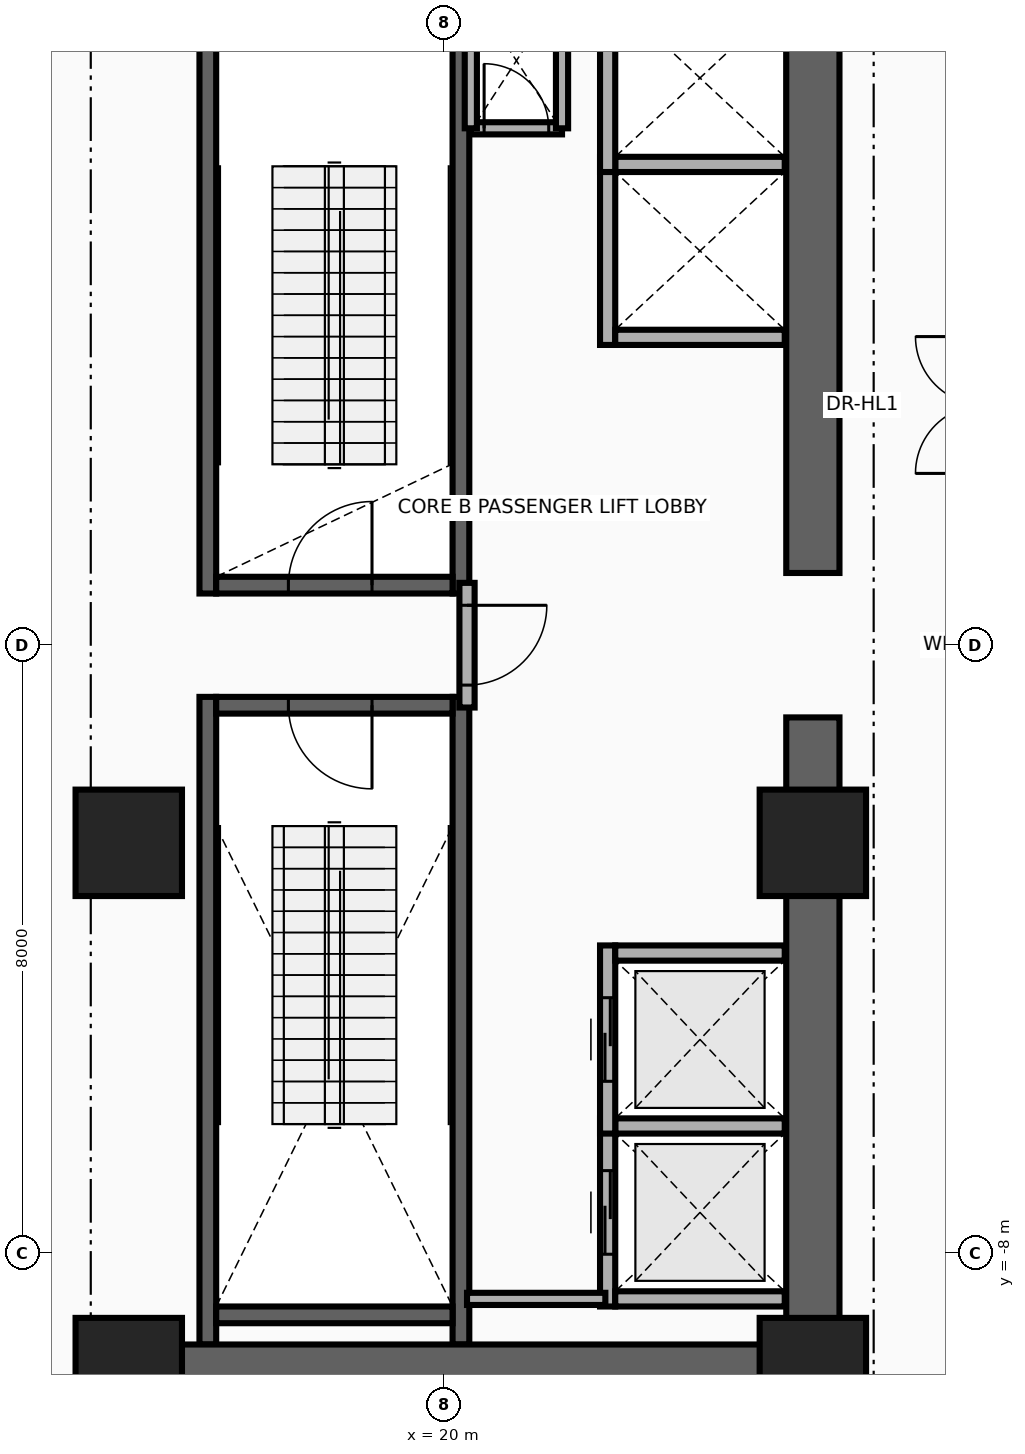
"""IFC4 building model, lengths in metres.
Left out: names, types, materials, properties, quantities, classifications, styles, units other than length and angle.
Written with IfcOpenShell. Run it as: python <this file> out.ifc"""

import sys

from ifc_helpers import new_model, si_unit, direction, frame, frame_2d, origin, origin_2d, place, context, subcontext, project, spatial, rectangle, extrude, source, transform, mapped, element, fill, save


model = new_model("IFC4")
c1 = context("Model", 3, precision=1e-05, world=origin(), true_north=direction((0.0, 1.0)))
c2 = subcontext(c1, "Body", "Model", "MODEL_VIEW")
j1 = project(units=[si_unit("LENGTHUNIT", "METRE"), si_unit("PLANEANGLEUNIT", "RADIAN")], contexts=[c1])
p1 = place(None, origin())
s1 = spatial("IfcSite", under=j1, at=p1, CompositionType="ELEMENT")
p2 = place(p1, origin())
s2 = spatial("IfcBuilding", under=s1, at=p2, CompositionType="ELEMENT")
p3 = place(p2, frame((0.0, 0.0, 15.6)))
s3 = spatial("IfcBuildingStorey", under=s2, at=p3, CompositionType="ELEMENT", Elevation=15.6)
for number, where, z_axis, x_axis in (
    (1, (16.89, 0.68, 0.0), (0.0, 0.0, 1.0), (0.0, 1.0, 0.0)),
    (2, (20.22, 0.68, 0.0), (0.0, 0.0, 1.0), (0.0, 1.0, 0.0)),
):
    element("IfcWall", number, at=place(p3, frame(where, z_axis=z_axis, x_axis=x_axis)), inside=s3, PredefinedType="SHEAR", context=c2, shape_type="SweptSolid", body=[
        extrude(rectangle(XDim=8.52, YDim=0.22, at=frame_2d((4.26, 0.0))), origin(), (0.0, 0.0, 1.0), 4.8),
    ])
p4 = place(p3, frame((17.0, 0.79, 0.0), z_axis=(0.0, 0.0, 1.0), x_axis=(1.0, 0.0, 0.0)))
e3 = element("IfcWall", 3, at=p4, inside=s3, PredefinedType="SHEAR", context=c2, shape_type="SweptSolid", body=[
    extrude(rectangle(XDim=3.11, YDim=0.22, at=frame_2d((1.555, 0.0))), origin(), (0.0, 0.0, 1.0), 4.8),
])
p5 = place(p4, frame((0.95, 0.0, 0.0)))
e4 = element("IfcOpeningElement", 4, at=p5, cuts=e3, PredefinedType="OPENING", context=c2, shape_type="SweptSolid", body=[
    extrude(rectangle(XDim=1.1, YDim=2.15, at=frame_2d((0.55, 1.075))), frame((0.0, 0.125, 0.0), z_axis=(0.0, -1.0, 0.0), x_axis=(1.0, 0.0, 0.0)), (0.0, 0.0, 1.0), 0.25),
])
for number, where, z_axis, x_axis in (
    (5, (16.89, -9.2, 0.0), (0.0, 0.0, 1.0), (0.0, 1.0, 0.0)),
    (6, (20.22, -9.2, 0.0), (0.0, 0.0, 1.0), (0.0, 1.0, 0.0)),
):
    element("IfcWall", number, at=place(p3, frame(where, z_axis=z_axis, x_axis=x_axis)), inside=s3, PredefinedType="SHEAR", context=c2, shape_type="SweptSolid", body=[
        extrude(rectangle(XDim=8.52, YDim=0.22, at=frame_2d((4.26, 0.0))), origin(), (0.0, 0.0, 1.0), 4.8),
    ])
p6 = place(p3, frame((17.0, -8.81, 0.0), z_axis=(0.0, 0.0, 1.0), x_axis=(1.0, 0.0, 0.0)))
e7 = element("IfcWall", 7, at=p6, inside=s3, PredefinedType="SHEAR", context=c2, shape_type="SweptSolid", body=[
    extrude(rectangle(XDim=3.11, YDim=0.22, at=frame_2d((1.555, 0.0))), origin(), (0.0, 0.0, 1.0), 4.8),
])
p7 = place(p3, frame((17.0, -0.79, 0.0), z_axis=(0.0, 0.0, 1.0), x_axis=(1.0, 0.0, 0.0)))
e8 = element("IfcWall", 8, at=p7, inside=s3, PredefinedType="SHEAR", context=c2, shape_type="SweptSolid", body=[
    extrude(rectangle(XDim=3.11, YDim=0.22, at=frame_2d((1.555, 0.0))), origin(), (0.0, 0.0, 1.0), 4.8),
])
p8 = place(p7, frame((0.95, 0.0, 0.0)))
e9 = element("IfcOpeningElement", 9, at=p8, cuts=e8, PredefinedType="OPENING", context=c2, shape_type="SweptSolid", body=[
    extrude(rectangle(XDim=1.1, YDim=2.15, at=frame_2d((0.55, 1.075))), frame((0.0, 0.125, 0.0), z_axis=(0.0, -1.0, 0.0), x_axis=(1.0, 0.0, 0.0)), (0.0, 0.0, 1.0), 0.25),
])
for number, where, z_axis, x_axis in (
    (10, (24.85, -9.9, 0.0), (0.0, 0.0, 1.0), (0.0, 1.0, 0.0)),
    (11, (24.85, 0.95, 0.0), (0.0, 0.0, 1.0), (0.0, 1.0, 0.0)),
):
    element("IfcWall", number, at=place(p3, frame(where, z_axis=z_axis, x_axis=x_axis)), inside=s3, PredefinedType="SHEAR", context=c2, shape_type="SweptSolid", body=[
        extrude(rectangle(XDim=8.95, YDim=0.7, at=frame_2d((4.475, 0.0))), origin(), (0.0, 0.0, 1.0), 4.8),
    ])
p9 = place(p3, frame((15.85, -9.55, 0.0), z_axis=(0.0, 0.0, 1.0), x_axis=(1.0, 0.0, 0.0)))
e12 = element("IfcWall", 12, at=p9, inside=s3, PredefinedType="SHEAR", context=c2, shape_type="SweptSolid", body=[
    extrude(rectangle(XDim=9.0, YDim=0.7, at=frame_2d((4.5, 0.0))), origin(), (0.0, 0.0, 1.0), 4.8),
])
m1 = source(origin(), c2, "Body", "SweptSolid", [
    extrude(rectangle(XDim=1.4, YDim=1.4, at=origin_2d()), origin(), (0.0, 0.0, 1.0), 5.2),
])
for number, where, z_axis, x_axis in (
    (13, (15.85, -9.55, 0.0), (0.0, 0.0, 1.0), (1.0, 0.0, 0.0)),
    (14, (24.85, -9.55, 0.0), (0.0, 0.0, 1.0), (1.0, 0.0, 0.0)),
    (15, (15.85, -2.6, 0.0), (0.0, 0.0, 1.0), (1.0, 0.0, 0.0)),
    (16, (24.85, -2.6, 0.0), (0.0, 0.0, 1.0), (1.0, 0.0, 0.0)),
):
    element("IfcColumn", number, at=place(p3, frame(where, z_axis=z_axis, x_axis=x_axis)), inside=s3, PredefinedType="COLUMN", context=c2, shape_type="MappedRepresentation", body=[
        mapped(m1, transform((0.0, 0.0, 0.0), x_axis=(1.0, 0.0, 0.0), y_axis=(0.0, 1.0, 0.0), z_axis=(0.0, 0.0, 1.0), scale=1.0)),
    ])
p10 = place(p3, frame((22.15, -8.7, 0.0), z_axis=(0.0, 0.0, 1.0), x_axis=(0.0, 1.0, 0.0)))
e17 = element("IfcWall", 17, at=p10, inside=s3, PredefinedType="MOVABLE", context=c2, shape_type="SweptSolid", body=[
    extrude(rectangle(XDim=2.475, YDim=0.2, at=frame_2d((1.237, 0.0))), origin(), (0.0, 0.0, 1.0), 4.8),
])
p11 = place(p10, frame((0.688, 0.0, 0.0)))
e18 = element("IfcOpeningElement", 18, at=p11, cuts=e17, PredefinedType="OPENING", context=c2, shape_type="SweptSolid", body=[
    extrude(rectangle(XDim=1.1, YDim=2.1, at=frame_2d((0.55, 1.05))), frame((0.0, 0.115, 0.0), z_axis=(0.0, -1.0, 0.0), x_axis=(1.0, 0.0, 0.0)), (0.0, 0.0, 1.0), 0.23),
])
for number, where, z_axis, x_axis in (
    (19, (22.25, -8.6, 0.0), (0.0, 0.0, 1.0), (1.0, 0.0, 0.0)),
    (20, (22.25, -6.325, 0.0), (0.0, 0.0, 1.0), (1.0, 0.0, 0.0)),
):
    element("IfcWall", number, at=place(p3, frame(where, z_axis=z_axis, x_axis=x_axis)), inside=s3, PredefinedType="MOVABLE", context=c2, shape_type="SweptSolid", body=[
        extrude(rectangle(XDim=2.23, YDim=0.2, at=frame_2d((1.115, 0.0))), origin(), (0.0, 0.0, 1.0), 4.8),
    ])
p12 = place(p3, frame((22.15, -6.425, 0.0), z_axis=(0.0, 0.0, 1.0), x_axis=(0.0, 1.0, 0.0)))
e21 = element("IfcWall", 21, at=p12, inside=s3, PredefinedType="MOVABLE", context=c2, shape_type="SweptSolid", body=[
    extrude(rectangle(XDim=2.475, YDim=0.2, at=frame_2d((1.238, 0.0))), origin(), (0.0, 0.0, 1.0), 4.8),
])
p13 = place(p12, frame((0.688, 0.0, 0.0)))
e22 = element("IfcOpeningElement", 22, at=p13, cuts=e21, PredefinedType="OPENING", context=c2, shape_type="SweptSolid", body=[
    extrude(rectangle(XDim=1.1, YDim=2.1, at=frame_2d((0.55, 1.05))), frame((0.0, 0.115, 0.0), z_axis=(0.0, -1.0, 0.0), x_axis=(1.0, 0.0, 0.0)), (0.0, 0.0, 1.0), 0.23),
])
p14 = place(p3, frame((22.25, -4.05, 0.0), z_axis=(0.0, 0.0, 1.0), x_axis=(1.0, 0.0, 0.0)))
e23 = element("IfcWall", 23, at=p14, inside=s3, PredefinedType="MOVABLE", context=c2, shape_type="SweptSolid", body=[
    extrude(rectangle(XDim=2.23, YDim=0.2, at=frame_2d((1.115, 0.0))), origin(), (0.0, 0.0, 1.0), 4.8),
])
p15 = place(p3, frame((22.15, 3.95, 0.0), z_axis=(0.0, 0.0, 1.0), x_axis=(0.0, 1.0, 0.0)))
e24 = element("IfcWall", 24, at=p15, inside=s3, PredefinedType="MOVABLE", context=c2, shape_type="SweptSolid", body=[
    extrude(rectangle(XDim=2.475, YDim=0.2, at=frame_2d((1.238, 0.0))), origin(), (0.0, 0.0, 1.0), 4.8),
])
for number, where, z_axis, x_axis in (
    (25, (22.25, 4.05, 0.0), (0.0, 0.0, 1.0), (1.0, 0.0, 0.0)),
    (26, (22.25, 6.325, 0.0), (0.0, 0.0, 1.0), (1.0, 0.0, 0.0)),
):
    element("IfcWall", number, at=place(p3, frame(where, z_axis=z_axis, x_axis=x_axis)), inside=s3, PredefinedType="MOVABLE", context=c2, shape_type="SweptSolid", body=[
        extrude(rectangle(XDim=2.23, YDim=0.2, at=frame_2d((1.115, 0.0))), origin(), (0.0, 0.0, 1.0), 3.745),
    ])
p16 = place(p3, frame((22.15, 6.225, 0.0), z_axis=(0.0, 0.0, 1.0), x_axis=(0.0, 1.0, 0.0)))
e27 = element("IfcWall", 27, at=p16, inside=s3, PredefinedType="MOVABLE", context=c2, shape_type="SweptSolid", body=[
    extrude(rectangle(XDim=2.475, YDim=0.2, at=frame_2d((1.237, 0.0))), origin(), (0.0, 0.0, 1.0), 4.8),
])
p17 = place(p3, frame((20.3, -0.82, 0.0), z_axis=(0.0, 0.0, 1.0), x_axis=(0.0, 1.0, 0.0)))
e28 = element("IfcWall", 28, at=p17, inside=s3, PredefinedType="PARTITIONING", context=c2, shape_type="SweptSolid", body=[
    extrude(rectangle(XDim=1.64, YDim=0.2, at=frame_2d((0.82, 0.0))), origin(), (0.0, 0.0, 1.0), 4.8),
])
p18 = place(p17, frame((0.295, 0.0, 0.0)))
e29 = element("IfcOpeningElement", 29, at=p18, cuts=e28, PredefinedType="OPENING", context=c2, shape_type="SweptSolid", body=[
    extrude(rectangle(XDim=1.05, YDim=2.15, at=frame_2d((0.525, 1.075))), frame((0.0, 0.115, 0.0), z_axis=(0.0, -1.0, 0.0), x_axis=(1.0, 0.0, 0.0)), (0.0, 0.0, 1.0), 0.23),
])
p19 = place(p3, frame((20.35, 6.8, 0.0), z_axis=(0.0, 0.0, 1.0), x_axis=(1.0, 0.0, 0.0)))
e30 = element("IfcWall", 30, at=p19, inside=s3, PredefinedType="PARTITIONING", context=c2, shape_type="SweptSolid", body=[
    extrude(rectangle(XDim=1.2, YDim=0.16, at=frame_2d((0.6, 0.0))), origin(), (0.0, 0.0, 1.0), 4.8),
])
p20 = place(p19, frame((0.175, 0.0, 0.0)))
e31 = element("IfcOpeningElement", 31, at=p20, cuts=e30, PredefinedType="OPENING", context=c2, shape_type="SweptSolid", body=[
    extrude(rectangle(XDim=0.85, YDim=2.05, at=frame_2d((0.425, 1.025))), frame((0.0, 0.095, 0.0), z_axis=(0.0, -1.0, 0.0), x_axis=(1.0, 0.0, 0.0)), (0.0, 0.0, 1.0), 0.19),
])
for number, where, z_axis, x_axis in (
    (32, (21.55, 6.8, 0.0), (0.0, 0.0, 1.0), (0.0, 1.0, 0.0)),
    (33, (20.35, 6.8, 0.0), (0.0, 0.0, 1.0), (0.0, 1.0, 0.0)),
):
    element("IfcWall", number, at=place(p3, frame(where, z_axis=z_axis, x_axis=x_axis)), inside=s3, PredefinedType="PARTITIONING", context=c2, shape_type="SweptSolid", body=[
        extrude(rectangle(XDim=1.8, YDim=0.16, at=frame_2d((0.9, 0.0))), origin(), (0.0, 0.0, 1.0), 4.8),
    ])
p21 = place(p3, frame((20.3, -8.6, 0.0), z_axis=(0.0, 0.0, 1.0), x_axis=(1.0, 0.0, 0.0)))
e34 = element("IfcWall", 34, at=p21, inside=s3, PredefinedType="PARTITIONING", context=c2, shape_type="SweptSolid", body=[
    extrude(rectangle(XDim=1.82, YDim=0.16, at=frame_2d((0.91, 0.0))), origin(), (0.0, 0.0, 1.0), 4.8),
])
p22 = place(p11, origin())
e35 = element("IfcDoor", 35, at=p22, inside=s3, OperationType="DOUBLE_DOOR_SLIDING", PredefinedType="DOOR", context=c2, shape_type="SweptSolid", body=[
    extrude(rectangle(XDim=1.1, YDim=2.1, at=frame_2d((0.55, 1.05))), frame((0.0, 0.025, 0.0), z_axis=(0.0, -1.0, 0.0), x_axis=(1.0, 0.0, 0.0)), (0.0, 0.0, 1.0), 0.05),
])
fill(e18, e35)
p23 = place(p13, origin())
e36 = element("IfcDoor", 36, at=p23, inside=s3, OperationType="DOUBLE_DOOR_SLIDING", PredefinedType="DOOR", context=c2, shape_type="SweptSolid", body=[
    extrude(rectangle(XDim=1.1, YDim=2.1, at=frame_2d((0.55, 1.05))), frame((0.0, 0.025, 0.0), z_axis=(0.0, -1.0, 0.0), x_axis=(1.0, 0.0, 0.0)), (0.0, 0.0, 1.0), 0.05),
])
fill(e22, e36)
p24 = place(p18, frame((1.05, 0.0, 0.0), z_axis=(0.0, 0.0, 1.0), x_axis=(-1.0, 0.0, 0.0)))
e37 = element("IfcDoor", 37, at=p24, inside=s3, OperationType="SINGLE_SWING_LEFT", PredefinedType="DOOR", context=c2, shape_type="SweptSolid", body=[
    extrude(rectangle(XDim=1.05, YDim=2.15, at=frame_2d((0.525, 1.075))), frame((0.0, 0.025, 0.0), z_axis=(0.0, -1.0, 0.0), x_axis=(1.0, 0.0, 0.0)), (0.0, 0.0, 1.0), 0.05),
])
fill(e29, e37)
p25 = place(p5, origin())
e38 = element("IfcDoor", 38, at=p25, inside=s3, OperationType="SINGLE_SWING_RIGHT", PredefinedType="DOOR", context=c2, shape_type="SweptSolid", body=[
    extrude(rectangle(XDim=1.1, YDim=2.15, at=frame_2d((0.55, 1.075))), frame((0.0, 0.025, 0.0), z_axis=(0.0, -1.0, 0.0), x_axis=(1.0, 0.0, 0.0)), (0.0, 0.0, 1.0), 0.05),
])
fill(e4, e38)
p26 = place(p8, frame((1.1, 0.0, 0.0), z_axis=(0.0, 0.0, 1.0), x_axis=(-1.0, 0.0, 0.0)))
e39 = element("IfcDoor", 39, at=p26, inside=s3, OperationType="SINGLE_SWING_LEFT", PredefinedType="DOOR", context=c2, shape_type="SweptSolid", body=[
    extrude(rectangle(XDim=1.1, YDim=2.15, at=frame_2d((0.55, 1.075))), frame((0.0, 0.025, 0.0), z_axis=(0.0, -1.0, 0.0), x_axis=(1.0, 0.0, 0.0)), (0.0, 0.0, 1.0), 0.05),
])
fill(e9, e39)
p27 = place(p20, origin())
e40 = element("IfcDoor", 40, at=p27, inside=s3, OperationType="SINGLE_SWING_RIGHT", PredefinedType="DOOR", context=c2, shape_type="SweptSolid", body=[
    extrude(rectangle(XDim=0.85, YDim=2.05, at=frame_2d((0.425, 1.025))), frame((0.0, 0.025, 0.0), z_axis=(0.0, -1.0, 0.0), x_axis=(1.0, 0.0, 0.0)), (0.0, 0.0, 1.0), 0.05),
])
fill(e31, e40)
save(model, sys.argv[1])
